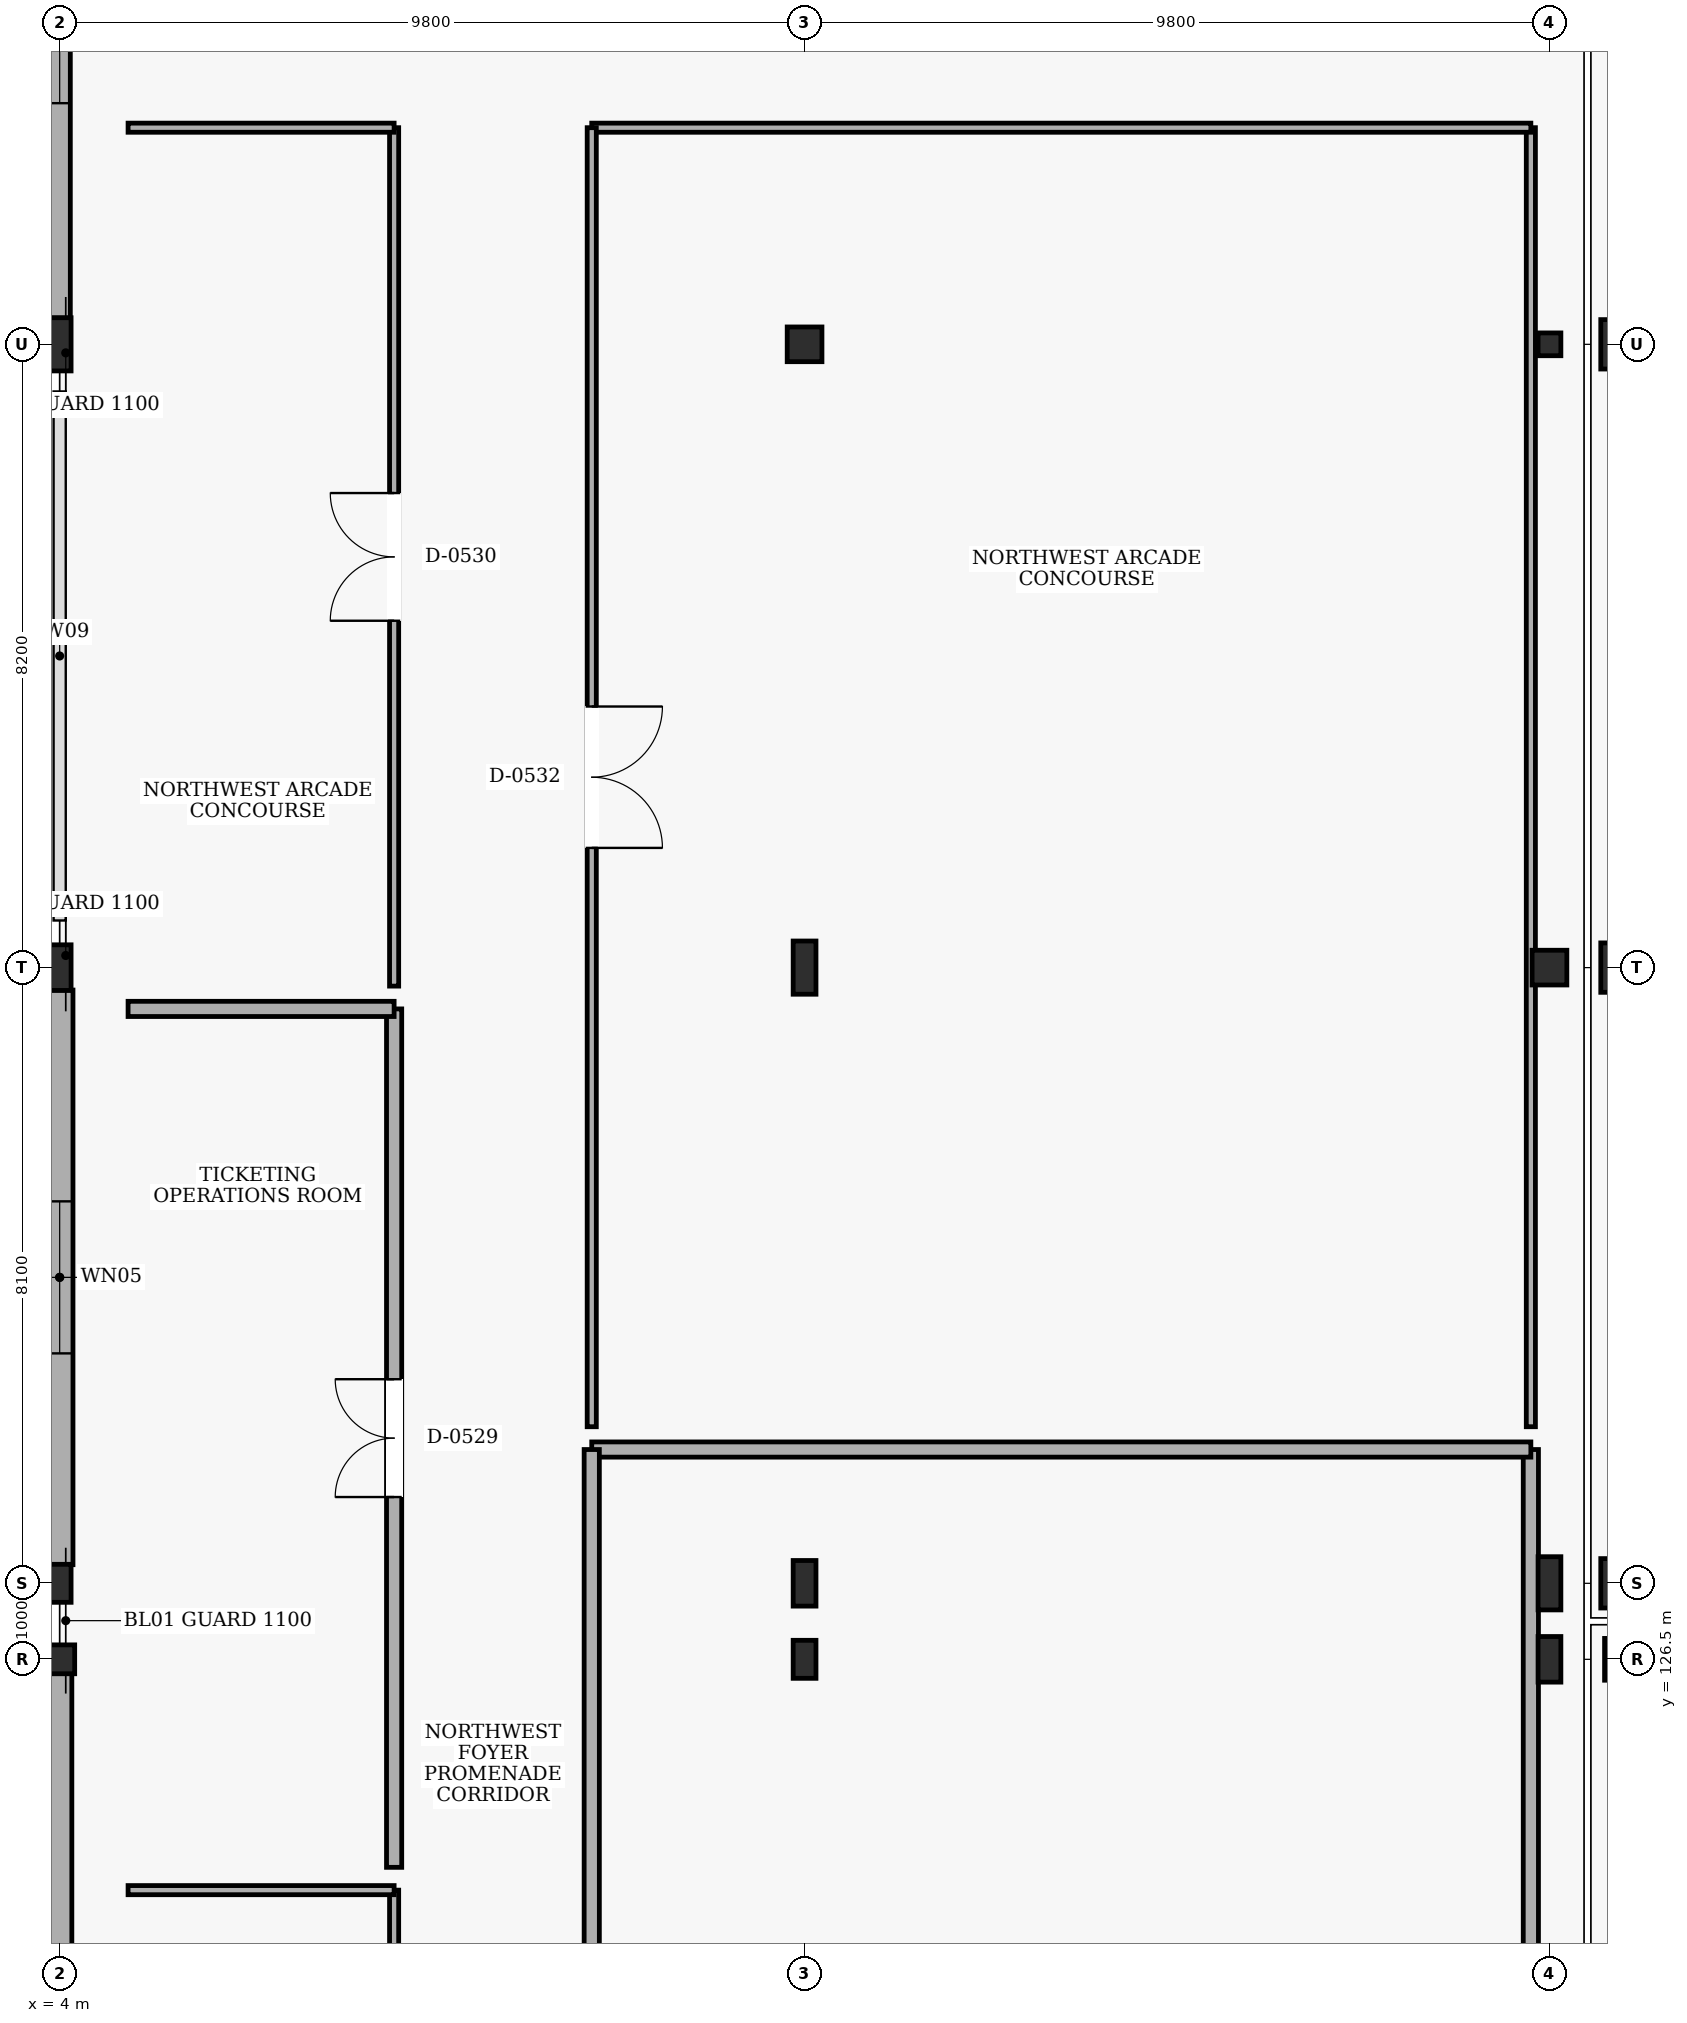
"""IFC4 building model, lengths in metres.
Left out: names, types, materials, properties, quantities, classifications, styles, units other than length and angle.
Written with IfcOpenShell. Run it as: python <this file> out.ifc"""

import sys

from ifc_helpers import new_model, si_unit, direction, frame, frame_2d, origin, origin_2d, place, context, subcontext, project, spatial, rectangle, hollow_rectangle, hollow_circle, i_section, extrude, element, fill, save


model = new_model("IFC4")
c1 = context("Model", 3, precision=1e-05, world=origin(), true_north=direction((0.0, 1.0)))
c2 = subcontext(c1, "Body", "Model", "MODEL_VIEW")
j1 = project(units=[si_unit("LENGTHUNIT", "METRE"), si_unit("PLANEANGLEUNIT", "RADIAN")], contexts=[c1])
p1 = place(None, origin())
s1 = spatial("IfcSite", under=j1, at=p1, CompositionType="ELEMENT")
p2 = place(p1, origin())
s2 = spatial("IfcBuilding", under=s1, at=p2, CompositionType="ELEMENT")
p3 = place(p2, frame((0.0, 0.0, 5.4)))
s3 = spatial("IfcBuildingStorey", under=s2, at=p3, CompositionType="ELEMENT", Elevation=5.4)
p4 = place(p3, frame((4.0, 126.5, 0.0), z_axis=(0.0, 0.0, 1.0), x_axis=(1.0, 0.0, 0.0)))
e1 = element("IfcColumn", 1, at=p4, inside=s3, PredefinedType="COLUMN", context=c2, shape_type="SweptSolid", body=[
    extrude(i_section(OverallWidth=0.395, OverallDepth=0.38, WebThickness=0.019, FlangeThickness=0.03, at=origin_2d()), origin(), (0.0, 0.0, 1.0), 4.8),
])
p5 = place(p3, frame((4.0, 127.5, 0.0), z_axis=(0.0, 0.0, 1.0), x_axis=(1.0, 0.0, 0.0)))
e2 = element("IfcColumn", 2, at=p5, inside=s3, PredefinedType="COLUMN", context=c2, shape_type="SweptSolid", body=[
    extrude(i_section(OverallWidth=0.3, OverallDepth=0.5, WebThickness=0.014, FlangeThickness=0.028, at=origin_2d()), origin(), (0.0, 0.0, 1.0), 4.8),
])
p6 = place(p3, frame((4.0, 135.6, 0.0), z_axis=(0.0, 0.0, 1.0), x_axis=(1.0, 0.0, 0.0)))
e3 = element("IfcColumn", 3, at=p6, inside=s3, PredefinedType="COLUMN", context=c2, shape_type="SweptSolid", body=[
    extrude(i_section(OverallWidth=0.3, OverallDepth=0.6, WebThickness=0.015, FlangeThickness=0.03, at=origin_2d()), origin(), (0.0, 0.0, 1.0), 4.8),
])
p7 = place(p3, frame((4.0, 143.8, 0.0), z_axis=(0.0, 0.0, 1.0), x_axis=(1.0, 0.0, 0.0)))
e4 = element("IfcColumn", 4, at=p7, inside=s3, PredefinedType="COLUMN", context=c2, shape_type="SweptSolid", body=[
    extrude(i_section(OverallWidth=0.3, OverallDepth=0.7, WebThickness=0.017, FlangeThickness=0.032, at=origin_2d()), origin(), (0.0, 0.0, 1.0), 4.8),
])
p8 = place(p3, frame((13.8, 126.5, 0.0), z_axis=(0.0, 0.0, 1.0), x_axis=(1.0, 0.0, 0.0)))
e5 = element("IfcColumn", 5, at=p8, inside=s3, PredefinedType="COLUMN", context=c2, shape_type="SweptSolid", body=[
    extrude(i_section(OverallWidth=0.3, OverallDepth=0.5, WebThickness=0.014, FlangeThickness=0.028, at=origin_2d()), origin(), (0.0, 0.0, 1.0), 4.8),
])
p9 = place(p3, frame((13.8, 127.5, 0.0), z_axis=(0.0, 0.0, 1.0), x_axis=(1.0, 0.0, 0.0)))
e6 = element("IfcColumn", 6, at=p9, inside=s3, PredefinedType="COLUMN", context=c2, shape_type="SweptSolid", body=[
    extrude(i_section(OverallWidth=0.3, OverallDepth=0.6, WebThickness=0.015, FlangeThickness=0.03, at=origin_2d()), origin(), (0.0, 0.0, 1.0), 4.8),
])
p10 = place(p3, frame((13.8, 135.6, 0.0), z_axis=(0.0, 0.0, 1.0), x_axis=(1.0, 0.0, 0.0)))
e7 = element("IfcColumn", 7, at=p10, inside=s3, PredefinedType="COLUMN", context=c2, shape_type="SweptSolid", body=[
    extrude(i_section(OverallWidth=0.3, OverallDepth=0.7, WebThickness=0.017, FlangeThickness=0.032, at=origin_2d()), origin(), (0.0, 0.0, 1.0), 4.8),
])
p11 = place(p3, frame((13.8, 143.8, 0.0), z_axis=(0.0, 0.0, 1.0), x_axis=(1.0, 0.0, 0.0)))
e8 = element("IfcColumn", 8, at=p11, inside=s3, PredefinedType="COLUMN", context=c2, shape_type="SweptSolid", body=[
    extrude(hollow_circle(Radius=0.229, WallThickness=0.02, at=origin_2d()), origin(), (0.0, 0.0, 1.0), 4.8),
])
p12 = place(p3, frame((23.6, 126.5, 0.0), z_axis=(0.0, 0.0, 1.0), x_axis=(1.0, 0.0, 0.0)))
e9 = element("IfcColumn", 9, at=p12, inside=s3, PredefinedType="COLUMN", context=c2, shape_type="SweptSolid", body=[
    extrude(i_section(OverallWidth=0.3, OverallDepth=0.6, WebThickness=0.015, FlangeThickness=0.03, at=origin_2d()), origin(), (0.0, 0.0, 1.0), 4.8),
])
p13 = place(p3, frame((23.6, 127.5, 0.0), z_axis=(0.0, 0.0, 1.0), x_axis=(1.0, 0.0, 0.0)))
e10 = element("IfcColumn", 10, at=p13, inside=s3, PredefinedType="COLUMN", context=c2, shape_type="SweptSolid", body=[
    extrude(i_section(OverallWidth=0.3, OverallDepth=0.7, WebThickness=0.017, FlangeThickness=0.032, at=origin_2d()), origin(), (0.0, 0.0, 1.0), 4.8),
])
p14 = place(p3, frame((23.6, 135.6, 0.0), z_axis=(0.0, 0.0, 1.0), x_axis=(1.0, 0.0, 0.0)))
e11 = element("IfcColumn", 11, at=p14, inside=s3, PredefinedType="COLUMN", context=c2, shape_type="SweptSolid", body=[
    extrude(hollow_circle(Radius=0.229, WallThickness=0.02, at=origin_2d()), origin(), (0.0, 0.0, 1.0), 4.8),
])
p15 = place(p3, frame((23.6, 143.8, 0.0), z_axis=(0.0, 0.0, 1.0), x_axis=(1.0, 0.0, 0.0)))
e12 = element("IfcColumn", 12, at=p15, inside=s3, PredefinedType="COLUMN", context=c2, shape_type="SweptSolid", body=[
    extrude(hollow_rectangle(XDim=0.3, YDim=0.3, WallThickness=0.016, at=origin_2d()), origin(), (0.0, 0.0, 1.0), 4.8),
])
p16 = place(p3, frame((24.6, 126.5, 0.0), z_axis=(0.0, 0.0, 1.0), x_axis=(1.0, 0.0, 0.0)))
e13 = element("IfcColumn", 13, at=p16, inside=s3, PredefinedType="COLUMN", context=c2, shape_type="SweptSolid", body=[
    extrude(rectangle(XDim=0.55, YDim=0.55, at=origin_2d()), origin(), (0.0, 0.0, 1.0), 4.8),
])
for number, where, z_axis, x_axis in (
    (14, (24.6, 127.5, 0.0), (0.0, 0.0, 1.0), (1.0, 0.0, 0.0)),
    (15, (24.6, 135.6, 0.0), (0.0, 0.0, 1.0), (1.0, 0.0, 0.0)),
    (16, (24.6, 143.8, 0.0), (0.0, 0.0, 1.0), (1.0, 0.0, 0.0)),
):
    element("IfcColumn", number, at=place(p3, frame(where, z_axis=z_axis, x_axis=x_axis)), inside=s3, PredefinedType="COLUMN", context=c2, shape_type="SweptSolid", body=[
        extrude(rectangle(XDim=0.65, YDim=0.65, at=origin_2d()), origin(), (0.0, 0.0, 1.0), 4.8),
    ])
p17 = place(p3, frame((4.0, 112.045, 0.0), z_axis=(0.0, 0.0, 1.0), x_axis=(0.0, 1.0, 0.0)))
e17 = element("IfcWall", 17, at=p17, inside=s3, PredefinedType="SOLIDWALL", context=c2, shape_type="SweptSolid", body=[
    extrude(rectangle(XDim=14.27, YDim=0.32, at=frame_2d((7.135, 0.0))), origin(), (0.0, 0.0, 1.0), 4.03),
])
p18 = place(p17, frame((6.235, 0.0, 0.9)))
e18 = element("IfcOpeningElement", 18, at=p18, cuts=e17, PredefinedType="OPENING", context=c2, shape_type="SweptSolid", body=[
    extrude(rectangle(XDim=1.8, YDim=1.5, at=frame_2d((0.9, 0.75))), frame((0.0, 0.17, 0.0), z_axis=(0.0, -1.0, 0.0), x_axis=(1.0, 0.0, 0.0)), (0.0, 0.0, 1.0), 0.34),
])
p19 = place(p3, frame((4.0, 127.745, 0.0), z_axis=(0.0, 0.0, 1.0), x_axis=(0.0, 1.0, 0.0)))
e19 = element("IfcWall", 19, at=p19, inside=s3, PredefinedType="SOLIDWALL", context=c2, shape_type="SweptSolid", body=[
    extrude(rectangle(XDim=7.56, YDim=0.35, at=frame_2d((3.78, 0.0))), origin(), (0.0, 0.0, 1.0), 3.78),
])
p20 = place(p19, frame((2.78, 0.0, 0.9)))
e20 = element("IfcOpeningElement", 20, at=p20, cuts=e19, PredefinedType="OPENING", context=c2, shape_type="SweptSolid", body=[
    extrude(rectangle(XDim=2.0, YDim=1.5, at=frame_2d((1.0, 0.75))), frame((0.0, 0.185, 0.0), z_axis=(0.0, -1.0, 0.0), x_axis=(1.0, 0.0, 0.0)), (0.0, 0.0, 1.0), 0.37),
])
p21 = place(p3, frame((4.0, 144.145, 0.0), z_axis=(0.0, 0.0, 1.0), x_axis=(0.0, 1.0, 0.0)))
e21 = element("IfcWall", 21, at=p21, inside=s3, PredefinedType="SOLIDWALL", context=c2, shape_type="SweptSolid", body=[
    extrude(rectangle(XDim=7.855, YDim=0.28, at=frame_2d((3.927, 0.0))), origin(), (0.0, 0.0, 1.0), 4.48),
])
p22 = place(p21, frame((2.827, 0.0, 0.9)))
e22 = element("IfcOpeningElement", 22, at=p22, cuts=e21, PredefinedType="OPENING", context=c2, shape_type="SweptSolid", body=[
    extrude(rectangle(XDim=2.2, YDim=1.5, at=frame_2d((1.1, 0.75))), frame((0.0, 0.15, 0.0), z_axis=(0.0, -1.0, 0.0), x_axis=(1.0, 0.0, 0.0)), (0.0, 0.0, 1.0), 0.3),
])
p23 = place(p3, frame((8.4, 112.17, 0.0), z_axis=(0.0, 0.0, 1.0), x_axis=(0.0, 1.0, 0.0)))
e23 = element("IfcWall", 23, at=p23, inside=s3, PredefinedType="PARTITIONING", context=c2, shape_type="SweptSolid", body=[
    extrude(rectangle(XDim=11.293, YDim=0.12, at=frame_2d((5.647, 0.0))), origin(), (0.0, 0.0, 1.0), 4.5),
])
p24 = place(p23, frame((4.947, 0.0, 0.0)))
e24 = element("IfcOpeningElement", 24, at=p24, cuts=e23, PredefinedType="OPENING", context=c2, shape_type="SweptSolid", body=[
    extrude(rectangle(XDim=1.4, YDim=2.2, at=frame_2d((0.7, 1.1))), frame((0.0, 0.07, 0.0), z_axis=(0.0, -1.0, 0.0), x_axis=(1.0, 0.0, 0.0)), (0.0, 0.0, 1.0), 0.14),
])
p25 = place(p3, frame((8.4, 123.463, 0.0), z_axis=(0.0, 0.0, 1.0), x_axis=(-1.0, 0.0, 0.0)))
e25 = element("IfcWall", 25, at=p25, inside=s3, PredefinedType="PARTITIONING", context=c2, shape_type="SweptSolid", body=[
    extrude(rectangle(XDim=3.5, YDim=0.12, at=frame_2d((1.75, 0.0))), origin(), (0.0, 0.0, 1.0), 4.5),
])
p26 = place(p3, frame((8.4, 123.763, 0.0), z_axis=(0.0, 0.0, 1.0), x_axis=(0.0, 1.0, 0.0)))
e26 = element("IfcWall", 26, at=p26, inside=s3, PredefinedType="PARTITIONING", context=c2, shape_type="SweptSolid", body=[
    extrude(rectangle(XDim=11.293, YDim=0.2, at=frame_2d((5.647, 0.0))), origin(), (0.0, 0.0, 1.0), 4.5),
])
p27 = place(p26, frame((4.872, 0.0, 0.0)))
e27 = element("IfcOpeningElement", 27, at=p27, cuts=e26, PredefinedType="OPENING", context=c2, shape_type="SweptSolid", body=[
    extrude(rectangle(XDim=1.55, YDim=2.2, at=frame_2d((0.775, 1.1))), frame((0.0, 0.11, 0.0), z_axis=(0.0, -1.0, 0.0), x_axis=(1.0, 0.0, 0.0)), (0.0, 0.0, 1.0), 0.22),
])
p28 = place(p3, frame((8.4, 135.057, 0.0), z_axis=(0.0, 0.0, 1.0), x_axis=(-1.0, 0.0, 0.0)))
e28 = element("IfcWall", 28, at=p28, inside=s3, PredefinedType="PARTITIONING", context=c2, shape_type="SweptSolid", body=[
    extrude(rectangle(XDim=3.5, YDim=0.2, at=frame_2d((1.75, 0.0))), origin(), (0.0, 0.0, 1.0), 4.5),
])
p29 = place(p3, frame((8.4, 135.357, 0.0), z_axis=(0.0, 0.0, 1.0), x_axis=(0.0, 1.0, 0.0)))
e29 = element("IfcWall", 29, at=p29, inside=s3, PredefinedType="PARTITIONING", context=c2, shape_type="SweptSolid", body=[
    extrude(rectangle(XDim=11.293, YDim=0.12, at=frame_2d((5.646, 0.0))), origin(), (0.0, 0.0, 1.0), 4.5),
])
p30 = place(p29, frame((4.807, 0.0, 0.0)))
e30 = element("IfcOpeningElement", 30, at=p30, cuts=e29, PredefinedType="OPENING", context=c2, shape_type="SweptSolid", body=[
    extrude(rectangle(XDim=1.68, YDim=2.25, at=frame_2d((0.84, 1.125))), frame((0.0, 0.07, 0.0), z_axis=(0.0, -1.0, 0.0), x_axis=(1.0, 0.0, 0.0)), (0.0, 0.0, 1.0), 0.14),
])
p31 = place(p3, frame((8.4, 146.65, 0.0), z_axis=(0.0, 0.0, 1.0), x_axis=(-1.0, 0.0, 0.0)))
e31 = element("IfcWall", 31, at=p31, inside=s3, PredefinedType="PARTITIONING", context=c2, shape_type="SweptSolid", body=[
    extrude(rectangle(XDim=3.5, YDim=0.12, at=frame_2d((1.75, 0.0))), origin(), (0.0, 0.0, 1.0), 4.5),
])
p32 = place(p3, frame((23.355, 112.17, 0.0), z_axis=(0.0, 0.0, 1.0), x_axis=(0.0, 1.0, 0.0)))
e32 = element("IfcWall", 32, at=p32, inside=s3, PredefinedType="PARTITIONING", context=c2, shape_type="SweptSolid", body=[
    extrude(rectangle(XDim=17.09, YDim=0.2, at=frame_2d((8.545, 0.0))), origin(), (0.0, 0.0, 1.0), 3.78),
])
p33 = place(p3, frame((23.355, 129.26, 0.0), z_axis=(0.0, 0.0, 1.0), x_axis=(-1.0, 0.0, 0.0)))
e33 = element("IfcWall", 33, at=p33, inside=s3, PredefinedType="PARTITIONING", context=c2, shape_type="SweptSolid", body=[
    extrude(rectangle(XDim=12.355, YDim=0.2, at=frame_2d((6.177, 0.0))), origin(), (0.0, 0.0, 1.0), 4.5),
])
p34 = place(p3, frame((11.0, 129.26, 0.0), z_axis=(0.0, 0.0, 1.0), x_axis=(0.0, -1.0, 0.0)))
e34 = element("IfcWall", 34, at=p34, inside=s3, PredefinedType="PARTITIONING", context=c2, shape_type="SweptSolid", body=[
    extrude(rectangle(XDim=17.09, YDim=0.2, at=frame_2d((8.545, 0.0))), origin(), (0.0, 0.0, 1.0), 4.5),
])
p35 = place(p34, frame((7.665, 0.0, 0.0)))
e35 = element("IfcOpeningElement", 35, at=p35, cuts=e34, PredefinedType="OPENING", context=c2, shape_type="SweptSolid", body=[
    extrude(rectangle(XDim=1.76, YDim=2.25, at=frame_2d((0.88, 1.125))), frame((0.0, 0.11, 0.0), z_axis=(0.0, -1.0, 0.0), x_axis=(1.0, 0.0, 0.0)), (0.0, 0.0, 1.0), 0.22),
])
p36 = place(p3, frame((23.355, 129.56, 0.0), z_axis=(0.0, 0.0, 1.0), x_axis=(0.0, 1.0, 0.0)))
e36 = element("IfcWall", 36, at=p36, inside=s3, PredefinedType="PARTITIONING", context=c2, shape_type="SweptSolid", body=[
    extrude(rectangle(XDim=17.09, YDim=0.12, at=frame_2d((8.545, 0.0))), origin(), (0.0, 0.0, 1.0), 3.78),
])
p37 = place(p3, frame((23.355, 146.65, 0.0), z_axis=(0.0, 0.0, 1.0), x_axis=(-1.0, 0.0, 0.0)))
e37 = element("IfcWall", 37, at=p37, inside=s3, PredefinedType="PARTITIONING", context=c2, shape_type="SweptSolid", body=[
    extrude(rectangle(XDim=12.355, YDim=0.12, at=frame_2d((6.177, 0.0))), origin(), (0.0, 0.0, 1.0), 4.5),
])
p38 = place(p3, frame((11.0, 146.65, 0.0), z_axis=(0.0, 0.0, 1.0), x_axis=(0.0, -1.0, 0.0)))
e38 = element("IfcWall", 38, at=p38, inside=s3, PredefinedType="PARTITIONING", context=c2, shape_type="SweptSolid", body=[
    extrude(rectangle(XDim=17.09, YDim=0.12, at=frame_2d((8.545, 0.0))), origin(), (0.0, 0.0, 1.0), 4.5),
])
p39 = place(p38, frame((7.615, 0.0, 0.0)))
e39 = element("IfcOpeningElement", 39, at=p39, cuts=e38, PredefinedType="OPENING", context=c2, shape_type="SweptSolid", body=[
    extrude(rectangle(XDim=1.86, YDim=2.3, at=frame_2d((0.93, 1.15))), frame((0.0, 0.07, 0.0), z_axis=(0.0, -1.0, 0.0), x_axis=(1.0, 0.0, 0.0)), (0.0, 0.0, 1.0), 0.14),
])
p40 = place(p20, origin())
e40 = element("IfcWindow", 40, at=p40, inside=s3, PartitioningType="SINGLE_PANEL", PredefinedType="WINDOW", context=c2, shape_type="SweptSolid", body=[
    extrude(rectangle(XDim=2.0, YDim=1.5, at=frame_2d((1.0, 0.75))), frame((0.0, 0.03, 0.0), z_axis=(0.0, -1.0, 0.0), x_axis=(1.0, 0.0, 0.0)), (0.0, 0.0, 1.0), 0.06),
])
fill(e20, e40)
p41 = place(p22, origin())
e41 = element("IfcWindow", 41, at=p41, inside=s3, PartitioningType="SINGLE_PANEL", PredefinedType="WINDOW", context=c2, shape_type="SweptSolid", body=[
    extrude(rectangle(XDim=2.2, YDim=1.5, at=frame_2d((1.1, 0.75))), frame((0.0, 0.03, 0.0), z_axis=(0.0, -1.0, 0.0), x_axis=(1.0, 0.0, 0.0)), (0.0, 0.0, 1.0), 0.06),
])
fill(e22, e41)
p42 = place(p27, origin())
e42 = element("IfcDoor", 42, at=p42, inside=s3, OperationType="DOUBLE_DOOR_SINGLE_SWING", PredefinedType="DOOR", context=c2, shape_type="SweptSolid", body=[
    extrude(rectangle(XDim=1.55, YDim=2.2, at=frame_2d((0.775, 1.1))), frame((0.0, 0.025, 0.0), z_axis=(0.0, -1.0, 0.0), x_axis=(1.0, 0.0, 0.0)), (0.0, 0.0, 1.0), 0.05),
])
fill(e27, e42)
p43 = place(p30, origin())
e43 = element("IfcDoor", 43, at=p43, inside=s3, OperationType="DOUBLE_DOOR_SINGLE_SWING", PredefinedType="DOOR", context=c2, shape_type="SweptSolid", body=[
    extrude(rectangle(XDim=1.68, YDim=2.25, at=frame_2d((0.84, 1.125))), frame((0.0, 0.025, 0.0), z_axis=(0.0, -1.0, 0.0), x_axis=(1.0, 0.0, 0.0)), (0.0, 0.0, 1.0), 0.05),
])
fill(e30, e43)
p44 = place(p39, origin())
e44 = element("IfcDoor", 44, at=p44, inside=s3, OperationType="DOUBLE_DOOR_SINGLE_SWING", PredefinedType="DOOR", context=c2, shape_type="SweptSolid", body=[
    extrude(rectangle(XDim=1.86, YDim=2.3, at=frame_2d((0.93, 1.15))), frame((0.0, 0.025, 0.0), z_axis=(0.0, -1.0, 0.0), x_axis=(1.0, 0.0, 0.0)), (0.0, 0.0, 1.0), 0.05),
])
fill(e39, e44)
save(model, sys.argv[1])
